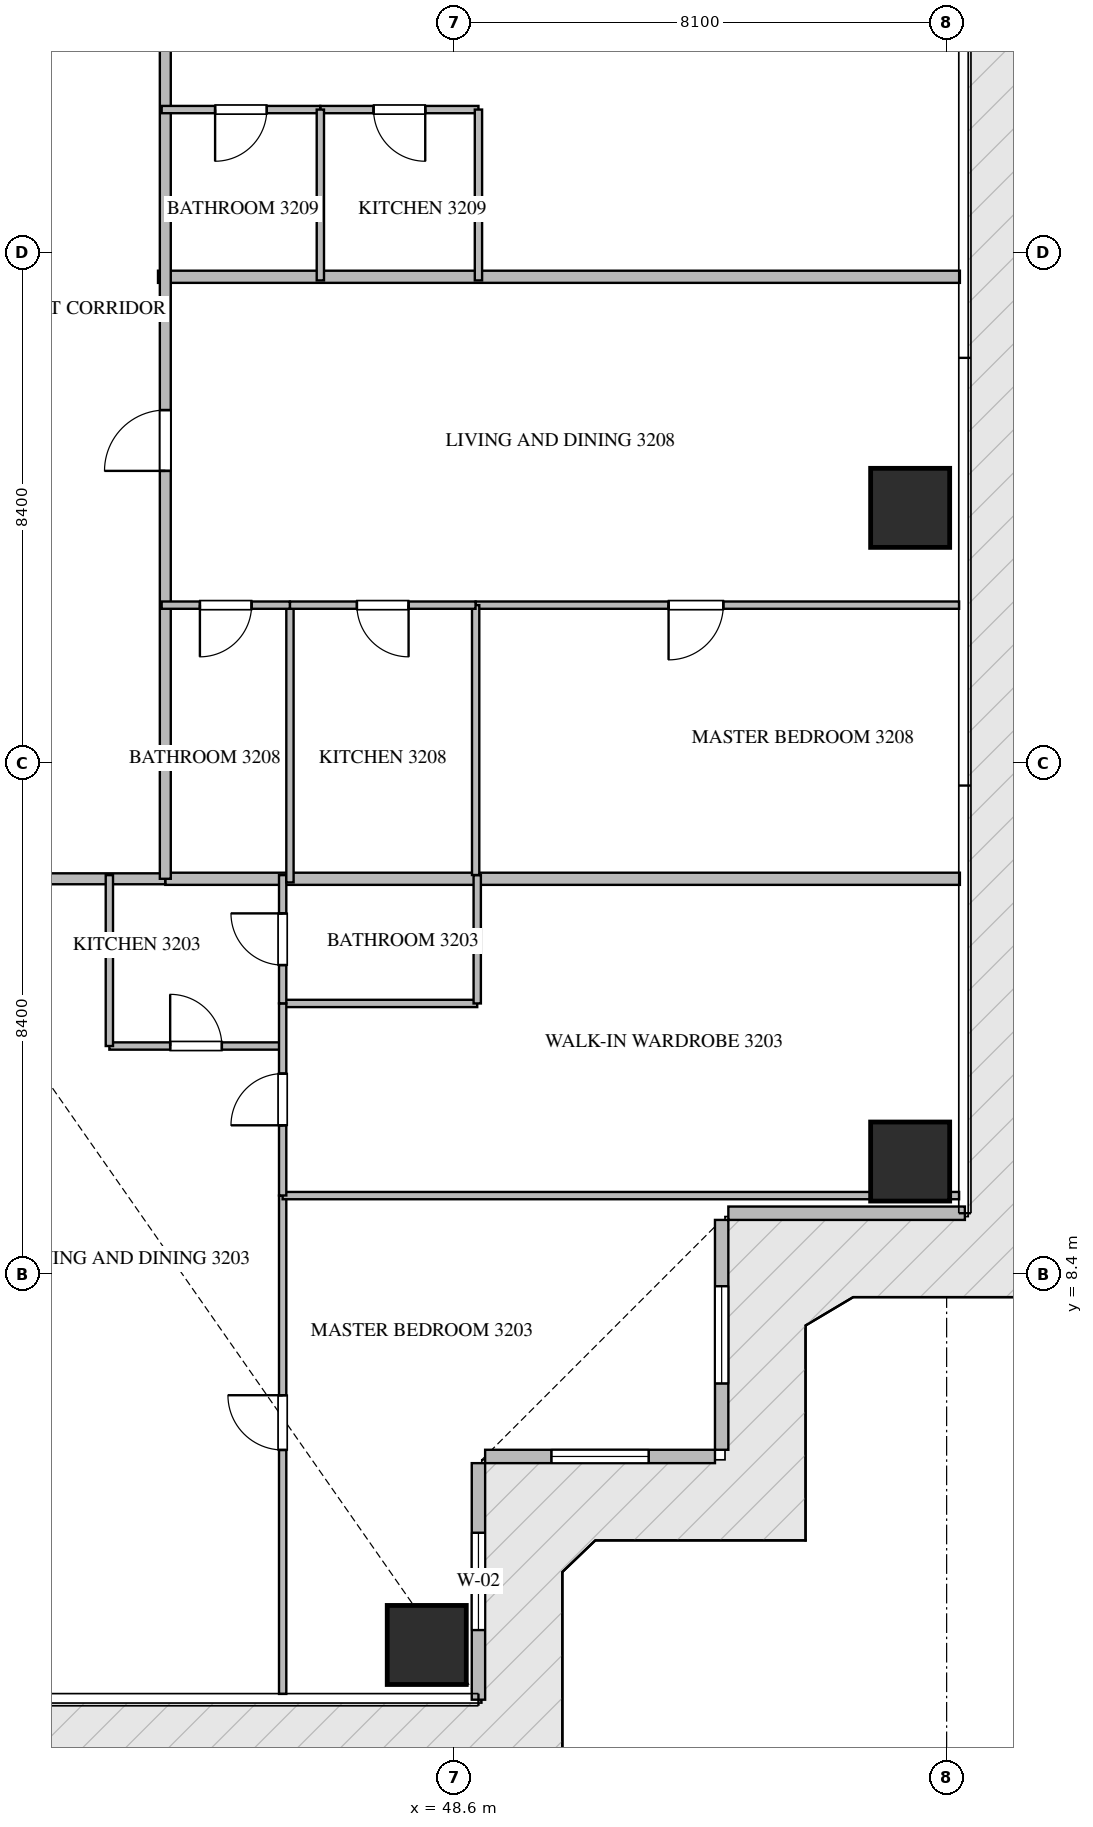
"""IFC4 building model, lengths in metres.
Left out: names, types, materials, properties, quantities, classifications, styles, units other than length and angle.
Written with IfcOpenShell. Run it as: python <this file> out.ifc"""

import sys

from ifc_helpers import new_model, si_unit, direction, frame, frame_2d, origin, origin_2d, place, context, subcontext, project, spatial, rectangle, extrude, source, transform, mapped, element, fill, save


model = new_model("IFC4")
c1 = context("Model", 3, precision=1e-05, world=origin(), true_north=direction((0.0, 1.0)))
c2 = subcontext(c1, "Body", "Model", "MODEL_VIEW")
j1 = project(units=[si_unit("LENGTHUNIT", "METRE"), si_unit("PLANEANGLEUNIT", "RADIAN")], contexts=[c1])
p1 = place(None, origin())
s1 = spatial("IfcSite", under=j1, at=p1, CompositionType="ELEMENT")
p2 = place(p1, origin())
s2 = spatial("IfcBuilding", under=s1, at=p2, CompositionType="ELEMENT")
p3 = place(p2, frame((0.0, 0.0, 131.4)))
s3 = spatial("IfcBuildingStorey", under=s2, at=p3, CompositionType="ELEMENT", Elevation=131.4)
m1 = source(origin(), c2, "Body", "SweptSolid", [
    extrude(rectangle(XDim=1.3, YDim=1.3, at=origin_2d()), origin(), (0.0, 0.0, 1.0), 3.75),
])
for number, where, z_axis, x_axis in (
    (1, (48.15, 2.3, -0.26), (0.0, 0.0, 1.0), (1.0, 0.0, 0.0)),
    (2, (56.1, 10.25, -0.26), (0.0, 0.0, 1.0), (1.0, 0.0, 0.0)),
    (3, (56.1, 21.0, -0.26), (0.0, 0.0, 1.0), (1.0, 0.0, 0.0)),
):
    element("IfcColumn", number, at=place(p3, frame(where, z_axis=z_axis, x_axis=x_axis)), inside=s3, PredefinedType="COLUMN", context=c2, shape_type="MappedRepresentation", body=[
        mapped(m1, transform((0.0, 0.0, 0.0), scale=1.0)),
    ])
p4 = place(p3, frame((49.0, 1.4, 0.0), z_axis=(0.0, 0.0, 1.0), x_axis=(0.0, 1.0, 0.0)))
e4 = element("IfcWall", 4, at=p4, inside=s3, PredefinedType="ELEMENTEDWALL", context=c2, shape_type="SweptSolid", body=[
    extrude(rectangle(XDim=3.89, YDim=0.22, at=frame_2d((1.945, 0.0))), origin(), (0.0, 0.0, 1.0), 3.475),
])
p5 = place(p4, frame((1.145, 0.0, 0.65)))
e5 = element("IfcOpeningElement", 5, at=p5, cuts=e4, PredefinedType="OPENING", context=c2, shape_type="SweptSolid", body=[
    extrude(rectangle(XDim=1.6, YDim=2.1, at=frame_2d((0.8, 1.05))), frame((0.0, 0.12, 0.0), z_axis=(0.0, -1.0, 0.0), x_axis=(1.0, 0.0, 0.0)), (0.0, 0.0, 1.0), 0.24),
])
p6 = place(p3, frame((49.11, 5.4, 0.0), z_axis=(0.0, 0.0, 1.0), x_axis=(1.0, 0.0, 0.0)))
e6 = element("IfcWall", 6, at=p6, inside=s3, PredefinedType="ELEMENTEDWALL", context=c2, shape_type="SweptSolid", body=[
    extrude(rectangle(XDim=3.78, YDim=0.22, at=frame_2d((1.89, 0.0))), origin(), (0.0, 0.0, 1.0), 3.475),
])
p7 = place(p6, frame((1.09, 0.0, 0.65)))
e7 = element("IfcOpeningElement", 7, at=p7, cuts=e6, PredefinedType="OPENING", context=c2, shape_type="SweptSolid", body=[
    extrude(rectangle(XDim=1.6, YDim=2.1, at=frame_2d((0.8, 1.05))), frame((0.0, 0.12, 0.0), z_axis=(0.0, -1.0, 0.0), x_axis=(1.0, 0.0, 0.0)), (0.0, 0.0, 1.0), 0.24),
])
p8 = place(p3, frame((53.0, 5.51, 0.0), z_axis=(0.0, 0.0, 1.0), x_axis=(0.0, 1.0, 0.0)))
e8 = element("IfcWall", 8, at=p8, inside=s3, PredefinedType="ELEMENTEDWALL", context=c2, shape_type="SweptSolid", body=[
    extrude(rectangle(XDim=3.78, YDim=0.22, at=frame_2d((1.89, 0.0))), origin(), (0.0, 0.0, 1.0), 3.475),
])
p9 = place(p8, frame((1.09, 0.0, 0.65)))
e9 = element("IfcOpeningElement", 9, at=p9, cuts=e8, PredefinedType="OPENING", context=c2, shape_type="SweptSolid", body=[
    extrude(rectangle(XDim=1.6, YDim=2.1, at=frame_2d((0.8, 1.05))), frame((0.0, 0.12, 0.0), z_axis=(0.0, -1.0, 0.0), x_axis=(1.0, 0.0, 0.0)), (0.0, 0.0, 1.0), 0.24),
])
p10 = place(p3, frame((53.11, 9.4, 0.0), z_axis=(0.0, 0.0, 1.0), x_axis=(1.0, 0.0, 0.0)))
e10 = element("IfcWall", 10, at=p10, inside=s3, PredefinedType="ELEMENTEDWALL", context=c2, shape_type="SweptSolid", body=[
    extrude(rectangle(XDim=3.89, YDim=0.22, at=frame_2d((1.945, 0.0))), origin(), (0.0, 0.0, 1.0), 3.475),
])
p11 = place(p3, frame((43.73, 24.8, 0.0), z_axis=(0.0, 0.0, 1.0), x_axis=(1.0, 0.0, 0.0)))
e11 = element("IfcWall", 11, at=p11, inside=s3, PredefinedType="PARTITIONING", context=c2, shape_type="SweptSolid", body=[
    extrude(rectangle(XDim=13.188, YDim=0.2, at=frame_2d((6.594, 0.0))), origin(), (0.0, 0.0, 1.0), 3.49),
])
p12 = place(p3, frame((43.85, 14.9, 0.0), z_axis=(0.0, 0.0, 1.0), x_axis=(1.0, 0.0, 0.0)))
e12 = element("IfcWall", 12, at=p12, inside=s3, PredefinedType="PARTITIONING", context=c2, shape_type="SweptSolid", body=[
    extrude(rectangle(XDim=13.068, YDim=0.2, at=frame_2d((6.534, 0.0))), origin(), (0.0, 0.0, 1.0), 3.49),
])
p13 = place(p3, frame((20.952, 14.9, 0.0), z_axis=(0.0, 0.0, 1.0), x_axis=(1.0, 0.0, 0.0)))
e13 = element("IfcWall", 13, at=p13, inside=s3, PredefinedType="PARTITIONING", context=c2, shape_type="SweptSolid", body=[
    extrude(rectangle(XDim=22.896, YDim=0.18, at=frame_2d((11.448, 0.0))), origin(), (0.0, 0.0, 1.0), 3.49),
])
p14 = place(p13, frame((2.19, 0.0, 0.0)))
e14 = element("IfcOpeningElement", 14, at=p14, cuts=e13, PredefinedType="OPENING", context=c2, shape_type="SweptSolid", body=[
    extrude(rectangle(XDim=1.0, YDim=2.15, at=frame_2d((0.5, 1.075))), frame((0.0, 0.1, 0.0), z_axis=(0.0, -1.0, 0.0), x_axis=(1.0, 0.0, 0.0)), (0.0, 0.0, 1.0), 0.2),
])
p15 = place(p13, frame((14.955, 0.0, 0.0)))
e15 = element("IfcOpeningElement", 15, at=p15, cuts=e13, PredefinedType="OPENING", context=c2, shape_type="SweptSolid", body=[
    extrude(rectangle(XDim=1.0, YDim=2.15, at=frame_2d((0.5, 1.075))), frame((0.0, 0.1, 0.0), z_axis=(0.0, -1.0, 0.0), x_axis=(1.0, 0.0, 0.0)), (0.0, 0.0, 1.0), 0.2),
])
p16 = place(p13, frame((19.509, 0.0, 0.0)))
e16 = element("IfcOpeningElement", 16, at=p16, cuts=e13, PredefinedType="OPENING", context=c2, shape_type="SweptSolid", body=[
    extrude(rectangle(XDim=1.0, YDim=2.15, at=frame_2d((0.5, 1.075))), frame((0.0, 0.1, 0.0), z_axis=(0.0, -1.0, 0.0), x_axis=(1.0, 0.0, 0.0)), (0.0, 0.0, 1.0), 0.2),
])
p17 = place(p3, frame((43.85, 14.9, 0.0), z_axis=(0.0, 0.0, 1.0), x_axis=(0.0, 1.0, 0.0)))
e17 = element("IfcWall", 17, at=p17, inside=s3, PredefinedType="PARTITIONING", context=c2, shape_type="SweptSolid", body=[
    extrude(rectangle(XDim=18.7, YDim=0.18, at=frame_2d((9.35, 0.0))), origin(), (0.0, 0.0, 1.0), 3.49),
])
p18 = place(p17, frame((6.708, 0.0, 0.0)))
e18 = element("IfcOpeningElement", 18, at=p18, cuts=e17, PredefinedType="OPENING", context=c2, shape_type="SweptSolid", body=[
    extrude(rectangle(XDim=1.0, YDim=2.15, at=frame_2d((0.5, 1.075))), frame((0.0, 0.1, 0.0), z_axis=(0.0, -1.0, 0.0), x_axis=(1.0, 0.0, 0.0)), (0.0, 0.0, 1.0), 0.2),
])
p19 = place(p17, frame((15.134, 0.0, 0.0)))
e19 = element("IfcOpeningElement", 19, at=p19, cuts=e17, PredefinedType="OPENING", context=c2, shape_type="SweptSolid", body=[
    extrude(rectangle(XDim=1.0, YDim=2.15, at=frame_2d((0.5, 1.075))), frame((0.0, 0.1, 0.0), z_axis=(0.0, -1.0, 0.0), x_axis=(1.0, 0.0, 0.0)), (0.0, 0.0, 1.0), 0.2),
])
p20 = place(p3, frame((42.93, 12.15, 0.0), z_axis=(0.0, 0.0, 1.0), x_axis=(1.0, 0.0, 0.0)))
e20 = element("IfcWall", 20, at=p20, inside=s3, PredefinedType="PARTITIONING", context=c2, shape_type="SweptSolid", body=[
    extrude(rectangle(XDim=2.85, YDim=0.12, at=frame_2d((1.425, 0.0))), origin(), (0.0, 0.0, 1.0), 3.49),
])
p21 = place(p20, frame((1.0, 0.0, 0.0)))
e21 = element("IfcOpeningElement", 21, at=p21, cuts=e20, PredefinedType="OPENING", context=c2, shape_type="SweptSolid", body=[
    extrude(rectangle(XDim=0.85, YDim=2.1, at=frame_2d((0.425, 1.05))), frame((0.0, 0.07, 0.0), z_axis=(0.0, -1.0, 0.0), x_axis=(1.0, 0.0, 0.0)), (0.0, 0.0, 1.0), 0.14),
])
p22 = place(p3, frame((42.93, 12.15, 0.0), z_axis=(0.0, 0.0, 1.0), x_axis=(0.0, 1.0, 0.0)))
e22 = element("IfcWall", 22, at=p22, inside=s3, PredefinedType="PARTITIONING", context=c2, shape_type="SweptSolid", body=[
    extrude(rectangle(XDim=2.81, YDim=0.12, at=frame_2d((1.405, 0.0))), origin(), (0.0, 0.0, 1.0), 3.49),
])
p23 = place(p3, frame((45.78, 1.495, 0.0), z_axis=(0.0, 0.0, 1.0), x_axis=(0.0, 1.0, 0.0)))
e23 = element("IfcWall", 23, at=p23, inside=s3, PredefinedType="PARTITIONING", context=c2, shape_type="SweptSolid", body=[
    extrude(rectangle(XDim=8.195, YDim=0.12, at=frame_2d((4.097, 0.0))), origin(), (0.0, 0.0, 1.0), 3.49),
])
p24 = place(p23, frame((4.012, 0.0, 0.0)))
e24 = element("IfcOpeningElement", 24, at=p24, cuts=e23, PredefinedType="OPENING", context=c2, shape_type="SweptSolid", body=[
    extrude(rectangle(XDim=0.9, YDim=2.1, at=frame_2d((0.45, 1.05))), frame((0.0, 0.07, 0.0), z_axis=(0.0, -1.0, 0.0), x_axis=(1.0, 0.0, 0.0)), (0.0, 0.0, 1.0), 0.14),
])
p25 = place(p3, frame((45.78, 9.69, 0.0), z_axis=(0.0, 0.0, 1.0), x_axis=(1.0, 0.0, 0.0)))
e25 = element("IfcWall", 25, at=p25, inside=s3, PredefinedType="PARTITIONING", context=c2, shape_type="SweptSolid", body=[
    extrude(rectangle(XDim=11.125, YDim=0.12, at=frame_2d((5.562, 0.0))), origin(), (0.0, 0.0, 1.0), 3.49),
])
p26 = place(p3, frame((45.78, 12.85, 0.0), z_axis=(0.0, 0.0, 1.0), x_axis=(1.0, 0.0, 0.0)))
e26 = element("IfcWall", 26, at=p26, inside=s3, PredefinedType="PARTITIONING", context=c2, shape_type="SweptSolid", body=[
    extrude(rectangle(XDim=3.2, YDim=0.12, at=frame_2d((1.6, 0.0))), origin(), (0.0, 0.0, 1.0), 3.49),
])
p27 = place(p3, frame((48.98, 12.85, 0.0), z_axis=(0.0, 0.0, 1.0), x_axis=(0.0, 1.0, 0.0)))
e27 = element("IfcWall", 27, at=p27, inside=s3, PredefinedType="PARTITIONING", context=c2, shape_type="SweptSolid", body=[
    extrude(rectangle(XDim=2.11, YDim=0.12, at=frame_2d((1.055, 0.0))), origin(), (0.0, 0.0, 1.0), 3.49),
])
p28 = place(p3, frame((45.78, 9.692, 0.0), z_axis=(0.0, 0.0, 1.0), x_axis=(0.0, 1.0, 0.0)))
e28 = element("IfcWall", 28, at=p28, inside=s3, PredefinedType="PARTITIONING", context=c2, shape_type="SweptSolid", body=[
    extrude(rectangle(XDim=3.158, YDim=0.12, at=frame_2d((1.579, 0.0))), origin(), (0.0, 0.0, 1.0), 3.49),
])
p29 = place(p28, frame((1.154, 0.0, 0.0)))
e29 = element("IfcOpeningElement", 29, at=p29, cuts=e28, PredefinedType="OPENING", context=c2, shape_type="SweptSolid", body=[
    extrude(rectangle(XDim=0.85, YDim=2.1, at=frame_2d((0.425, 1.05))), frame((0.0, 0.07, 0.0), z_axis=(0.0, -1.0, 0.0), x_axis=(1.0, 0.0, 0.0)), (0.0, 0.0, 1.0), 0.14),
])
p30 = place(p3, frame((45.78, 12.852, 0.0), z_axis=(0.0, 0.0, 1.0), x_axis=(0.0, 1.0, 0.0)))
e30 = element("IfcWall", 30, at=p30, inside=s3, PredefinedType="PARTITIONING", context=c2, shape_type="SweptSolid", body=[
    extrude(rectangle(XDim=2.108, YDim=0.12, at=frame_2d((1.054, 0.0))), origin(), (0.0, 0.0, 1.0), 3.49),
])
p31 = place(p30, frame((0.629, 0.0, 0.0)))
e31 = element("IfcOpeningElement", 31, at=p31, cuts=e30, PredefinedType="OPENING", context=c2, shape_type="SweptSolid", body=[
    extrude(rectangle(XDim=0.85, YDim=2.1, at=frame_2d((0.425, 1.05))), frame((0.0, 0.07, 0.0), z_axis=(0.0, -1.0, 0.0), x_axis=(1.0, 0.0, 0.0)), (0.0, 0.0, 1.0), 0.14),
])
p32 = place(p3, frame((56.905, 19.4, 0.0), z_axis=(0.0, 0.0, 1.0), x_axis=(-1.0, 0.0, 0.0)))
e32 = element("IfcWall", 32, at=p32, inside=s3, PredefinedType="PARTITIONING", context=c2, shape_type="SweptSolid", body=[
    extrude(rectangle(XDim=7.951, YDim=0.12, at=frame_2d((3.976, 0.0))), origin(), (0.0, 0.0, 1.0), 3.49),
])
p33 = place(p32, frame((3.878, 0.0, 0.0)))
e33 = element("IfcOpeningElement", 33, at=p33, cuts=e32, PredefinedType="OPENING", context=c2, shape_type="SweptSolid", body=[
    extrude(rectangle(XDim=0.9, YDim=2.1, at=frame_2d((0.45, 1.05))), frame((0.0, 0.07, 0.0), z_axis=(0.0, -1.0, 0.0), x_axis=(1.0, 0.0, 0.0)), (0.0, 0.0, 1.0), 0.14),
])
p34 = place(p3, frame((48.954, 14.962, 0.0), z_axis=(0.0, 0.0, 1.0), x_axis=(0.0, 1.0, 0.0)))
e34 = element("IfcWall", 34, at=p34, inside=s3, PredefinedType="PARTITIONING", context=c2, shape_type="SweptSolid", body=[
    extrude(rectangle(XDim=4.438, YDim=0.12, at=frame_2d((2.219, 0.0))), origin(), (0.0, 0.0, 1.0), 3.49),
])
p35 = place(p3, frame((45.9, 14.84, 0.0), z_axis=(0.0, 0.0, 1.0), x_axis=(0.0, 1.0, 0.0)))
e35 = element("IfcWall", 35, at=p35, inside=s3, PredefinedType="PARTITIONING", context=c2, shape_type="SweptSolid", body=[
    extrude(rectangle(XDim=4.56, YDim=0.12, at=frame_2d((2.28, 0.0))), origin(), (0.0, 0.0, 1.0), 3.49),
])
p36 = place(p3, frame((48.952, 19.4, 0.0), z_axis=(0.0, 0.0, 1.0), x_axis=(-1.0, 0.0, 0.0)))
e36 = element("IfcWall", 36, at=p36, inside=s3, PredefinedType="PARTITIONING", context=c2, shape_type="SweptSolid", body=[
    extrude(rectangle(XDim=3.052, YDim=0.12, at=frame_2d((1.526, 0.0))), origin(), (0.0, 0.0, 1.0), 3.49),
])
p37 = place(p36, frame((1.101, 0.0, 0.0)))
e37 = element("IfcOpeningElement", 37, at=p37, cuts=e36, PredefinedType="OPENING", context=c2, shape_type="SweptSolid", body=[
    extrude(rectangle(XDim=0.85, YDim=2.1, at=frame_2d((0.425, 1.05))), frame((0.0, 0.07, 0.0), z_axis=(0.0, -1.0, 0.0), x_axis=(1.0, 0.0, 0.0)), (0.0, 0.0, 1.0), 0.14),
])
p38 = place(p3, frame((45.898, 19.4, 0.0), z_axis=(0.0, 0.0, 1.0), x_axis=(-1.0, 0.0, 0.0)))
e38 = element("IfcWall", 38, at=p38, inside=s3, PredefinedType="PARTITIONING", context=c2, shape_type="SweptSolid", body=[
    extrude(rectangle(XDim=2.108, YDim=0.12, at=frame_2d((1.054, 0.0))), origin(), (0.0, 0.0, 1.0), 3.49),
])
p39 = place(p38, frame((0.629, 0.0, 0.0)))
e39 = element("IfcOpeningElement", 39, at=p39, cuts=e38, PredefinedType="OPENING", context=c2, shape_type="SweptSolid", body=[
    extrude(rectangle(XDim=0.85, YDim=2.1, at=frame_2d((0.425, 1.05))), frame((0.0, 0.07, 0.0), z_axis=(0.0, -1.0, 0.0), x_axis=(1.0, 0.0, 0.0)), (0.0, 0.0, 1.0), 0.14),
])
p40 = place(p3, frame((49.0, 27.55, 0.0), z_axis=(0.0, 0.0, 1.0), x_axis=(-1.0, 0.0, 0.0)))
e40 = element("IfcWall", 40, at=p40, inside=s3, PredefinedType="PARTITIONING", context=c2, shape_type="SweptSolid", body=[
    extrude(rectangle(XDim=2.6, YDim=0.12, at=frame_2d((1.3, 0.0))), origin(), (0.0, 0.0, 1.0), 3.49),
])
p41 = place(p40, frame((0.875, 0.0, 0.0)))
e41 = element("IfcOpeningElement", 41, at=p41, cuts=e40, PredefinedType="OPENING", context=c2, shape_type="SweptSolid", body=[
    extrude(rectangle(XDim=0.85, YDim=2.1, at=frame_2d((0.425, 1.05))), frame((0.0, 0.07, 0.0), z_axis=(0.0, -1.0, 0.0), x_axis=(1.0, 0.0, 0.0)), (0.0, 0.0, 1.0), 0.14),
])
p42 = place(p3, frame((46.398, 27.55, 0.0), z_axis=(0.0, 0.0, 1.0), x_axis=(-1.0, 0.0, 0.0)))
e42 = element("IfcWall", 42, at=p42, inside=s3, PredefinedType="PARTITIONING", context=c2, shape_type="SweptSolid", body=[
    extrude(rectangle(XDim=2.608, YDim=0.12, at=frame_2d((1.304, 0.0))), origin(), (0.0, 0.0, 1.0), 3.49),
])
p43 = place(p42, frame((0.879, 0.0, 0.0)))
e43 = element("IfcOpeningElement", 43, at=p43, cuts=e42, PredefinedType="OPENING", context=c2, shape_type="SweptSolid", body=[
    extrude(rectangle(XDim=0.85, YDim=2.1, at=frame_2d((0.425, 1.05))), frame((0.0, 0.07, 0.0), z_axis=(0.0, -1.0, 0.0), x_axis=(1.0, 0.0, 0.0)), (0.0, 0.0, 1.0), 0.14),
])
for number, where, z_axis, x_axis in (
    (44, (46.4, 24.74, 0.0), (0.0, 0.0, 1.0), (0.0, 1.0, 0.0)),
    (45, (49.0, 24.74, 0.0), (0.0, 0.0, 1.0), (0.0, 1.0, 0.0)),
):
    element("IfcWall", number, at=place(p3, frame(where, z_axis=z_axis, x_axis=x_axis)), inside=s3, PredefinedType="PARTITIONING", context=c2, shape_type="SweptSolid", body=[
        extrude(rectangle(XDim=2.81, YDim=0.12, at=frame_2d((1.405, 0.0))), origin(), (0.0, 0.0, 1.0), 3.49),
    ])
m2 = source(origin(), c2, "Body", "SweptSolid", [
    extrude(rectangle(XDim=1.6, YDim=2.1, at=frame_2d((0.8, 1.05))), frame((0.0, 0.03, 0.0), z_axis=(0.0, -1.0, 0.0), x_axis=(1.0, 0.0, 0.0)), (0.0, 0.0, 1.0), 0.06),
])
p44 = place(p5, origin())
e46 = element("IfcWindow", 46, at=p44, inside=s3, PartitioningType="SINGLE_PANEL", PredefinedType="WINDOW", context=c2, shape_type="MappedRepresentation", body=[
    mapped(m2, transform((0.0, 0.0, 0.0), scale=1.0)),
])
fill(e5, e46)
p45 = place(p7, origin())
e47 = element("IfcWindow", 47, at=p45, inside=s3, PartitioningType="SINGLE_PANEL", PredefinedType="WINDOW", context=c2, shape_type="MappedRepresentation", body=[
    mapped(m2, transform((0.0, 0.0, 0.0), scale=1.0)),
])
fill(e7, e47)
p46 = place(p9, origin())
e48 = element("IfcWindow", 48, at=p46, inside=s3, PartitioningType="SINGLE_PANEL", PredefinedType="WINDOW", context=c2, shape_type="MappedRepresentation", body=[
    mapped(m2, transform((0.0, 0.0, 0.0), scale=1.0)),
])
fill(e9, e48)
m3 = source(origin(), c2, "Body", "SweptSolid", [
    extrude(rectangle(XDim=1.0, YDim=2.15, at=frame_2d((0.5, 1.075))), frame((0.0, 0.025, 0.0), z_axis=(0.0, -1.0, 0.0), x_axis=(1.0, 0.0, 0.0)), (0.0, 0.0, 1.0), 0.05),
])
p47 = place(p18, origin())
e49 = element("IfcDoor", 49, at=p47, inside=s3, OperationType="SINGLE_SWING_LEFT", PredefinedType="DOOR", context=c2, shape_type="MappedRepresentation", body=[
    mapped(m3, transform((0.0, 0.0, 0.0), scale=1.0)),
])
fill(e18, e49)
m4 = source(origin(), c2, "Body", "SweptSolid", [
    extrude(rectangle(XDim=0.85, YDim=2.1, at=frame_2d((0.425, 1.05))), frame((0.0, 0.025, 0.0), z_axis=(0.0, -1.0, 0.0), x_axis=(1.0, 0.0, 0.0)), (0.0, 0.0, 1.0), 0.05),
])
p48 = place(p21, origin())
e50 = element("IfcDoor", 50, at=p48, inside=s3, OperationType="SINGLE_SWING_LEFT", PredefinedType="DOOR", context=c2, shape_type="MappedRepresentation", body=[
    mapped(m4, transform((0.0, 0.0, 0.0), scale=1.0)),
])
fill(e21, e50)
m5 = source(origin(), c2, "Body", "SweptSolid", [
    extrude(rectangle(XDim=0.9, YDim=2.1, at=frame_2d((0.45, 1.05))), frame((0.0, 0.025, 0.0), z_axis=(0.0, -1.0, 0.0), x_axis=(1.0, 0.0, 0.0)), (0.0, 0.0, 1.0), 0.05),
])
p49 = place(p24, origin())
e51 = element("IfcDoor", 51, at=p49, inside=s3, OperationType="SINGLE_SWING_RIGHT", PredefinedType="DOOR", context=c2, shape_type="MappedRepresentation", body=[
    mapped(m5, transform((0.0, 0.0, 0.0), scale=1.0)),
])
fill(e24, e51)
p50 = place(p29, origin())
e52 = element("IfcDoor", 52, at=p50, inside=s3, OperationType="SINGLE_SWING_LEFT", PredefinedType="DOOR", context=c2, shape_type="MappedRepresentation", body=[
    mapped(m4, transform((0.0, 0.0, 0.0), scale=1.0)),
])
fill(e29, e52)
p51 = place(p31, origin())
e53 = element("IfcDoor", 53, at=p51, inside=s3, OperationType="SINGLE_SWING_RIGHT", PredefinedType="DOOR", context=c2, shape_type="MappedRepresentation", body=[
    mapped(m4, transform((0.0, 0.0, 0.0), scale=1.0)),
])
fill(e31, e53)
p52 = place(p33, origin())
e54 = element("IfcDoor", 54, at=p52, inside=s3, OperationType="SINGLE_SWING_RIGHT", PredefinedType="DOOR", context=c2, shape_type="MappedRepresentation", body=[
    mapped(m5, transform((0.0, 0.0, 0.0), scale=1.0)),
])
fill(e33, e54)
p53 = place(p37, origin())
e55 = element("IfcDoor", 55, at=p53, inside=s3, OperationType="SINGLE_SWING_LEFT", PredefinedType="DOOR", context=c2, shape_type="MappedRepresentation", body=[
    mapped(m4, transform((0.0, 0.0, 0.0), scale=1.0)),
])
fill(e37, e55)
p54 = place(p39, origin())
e56 = element("IfcDoor", 56, at=p54, inside=s3, OperationType="SINGLE_SWING_RIGHT", PredefinedType="DOOR", context=c2, shape_type="MappedRepresentation", body=[
    mapped(m4, transform((0.0, 0.0, 0.0), scale=1.0)),
])
fill(e39, e56)
p55 = place(p41, origin())
e57 = element("IfcDoor", 57, at=p55, inside=s3, OperationType="SINGLE_SWING_LEFT", PredefinedType="DOOR", context=c2, shape_type="MappedRepresentation", body=[
    mapped(m4, transform((0.0, 0.0, 0.0), scale=1.0)),
])
fill(e41, e57)
p56 = place(p43, origin())
e58 = element("IfcDoor", 58, at=p56, inside=s3, OperationType="SINGLE_SWING_RIGHT", PredefinedType="DOOR", context=c2, shape_type="MappedRepresentation", body=[
    mapped(m4, transform((0.0, 0.0, 0.0), scale=1.0)),
])
fill(e43, e58)
save(model, sys.argv[1])
